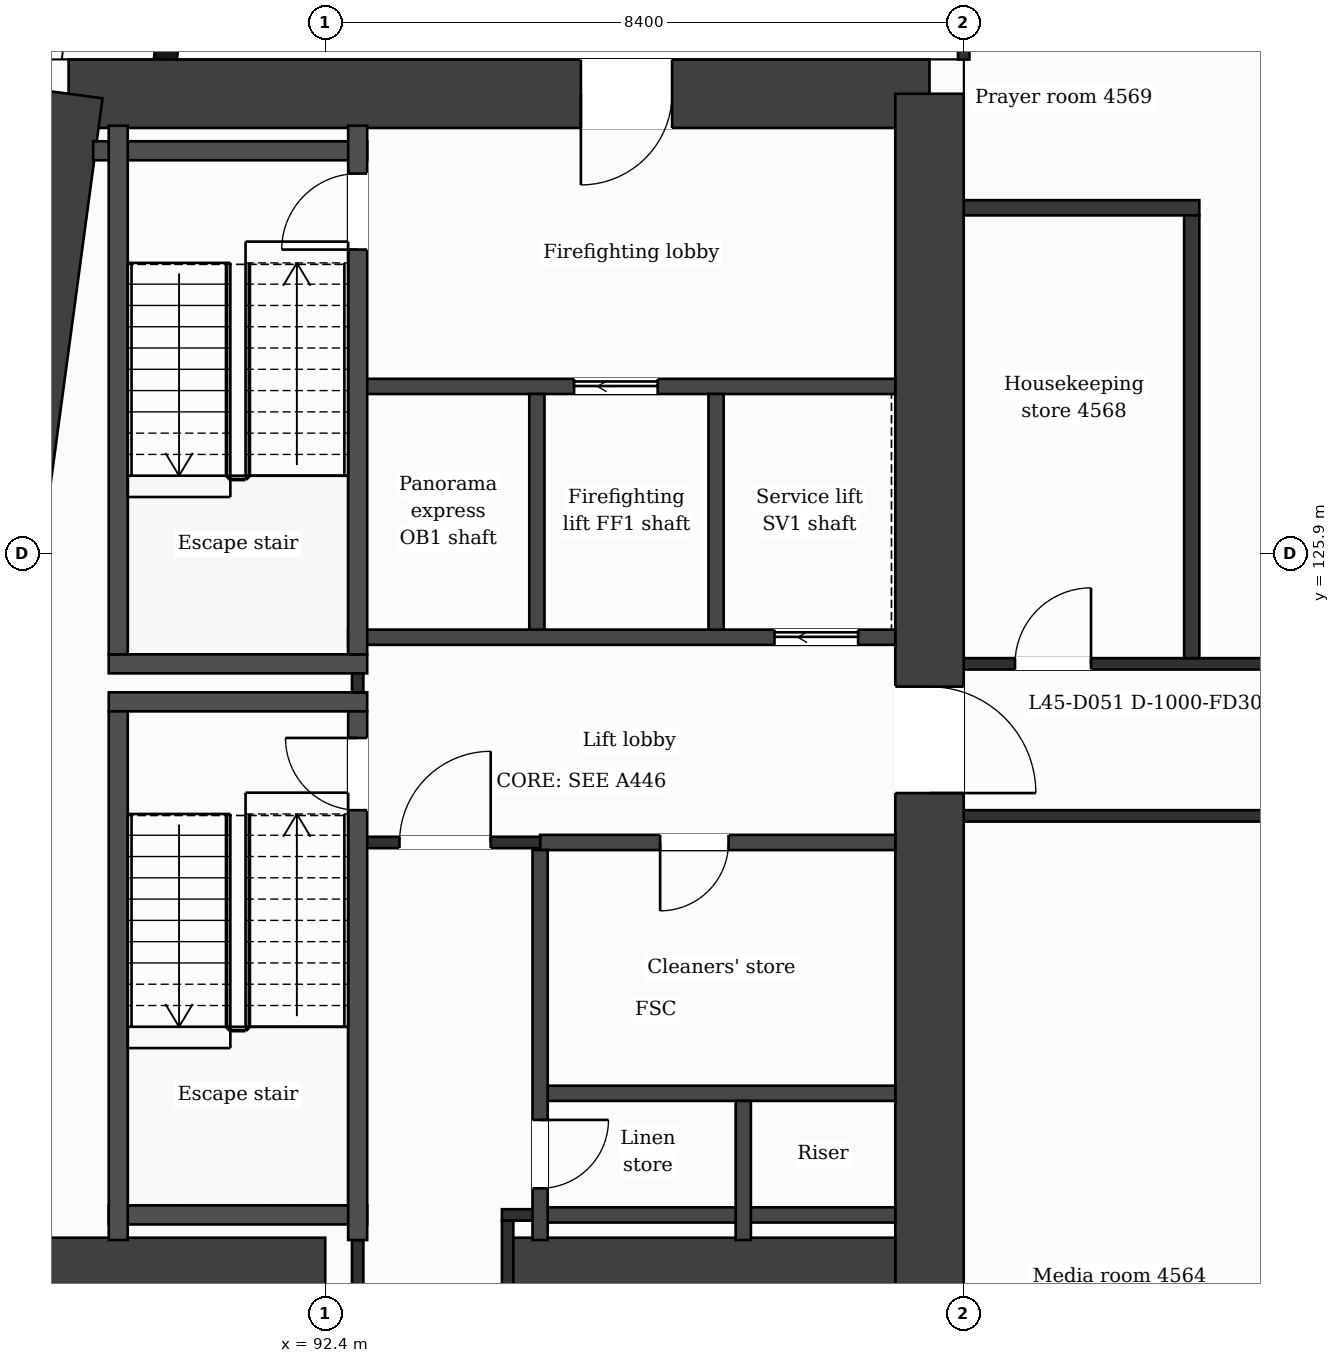
"""IFC4 building model, lengths in metres.
Left out: names, types, materials, properties, quantities, classifications, styles, units other than length and angle.
Written with IfcOpenShell. Run it as: python <this file> out.ifc"""

import sys

from ifc_helpers import new_model, si_unit, direction, frame, frame_2d, origin, place, context, subcontext, project, spatial, rectangle, extrude, element, fill, save


model = new_model("IFC4")
c1 = context("Model", 3, precision=1e-05, world=origin(), true_north=direction((0.0, 1.0)))
c2 = subcontext(c1, "Body", "Model", "MODEL_VIEW")
j1 = project(units=[si_unit("LENGTHUNIT", "METRE"), si_unit("PLANEANGLEUNIT", "RADIAN")], contexts=[c1])
p1 = place(None, origin())
s1 = spatial("IfcSite", under=j1, at=p1, CompositionType="ELEMENT")
p2 = place(p1, origin())
s2 = spatial("IfcBuilding", under=s1, at=p2, CompositionType="ELEMENT")
p3 = place(p2, frame((0.0, 0.0, 188.5)))
s3 = spatial("IfcBuildingStorey", under=s2, at=p3, CompositionType="ELEMENT", Elevation=188.5)
p4 = place(p3, frame((89.024, 131.95, 0.0), z_axis=(0.0, 0.0, 1.0), x_axis=(1.0, 0.0, 0.0)))
e1 = element("IfcWall", 1, at=p4, inside=s3, PredefinedType="SHEAR", context=c2, shape_type="SweptSolid", body=[
    extrude(rectangle(XDim=11.326, YDim=0.9, at=frame_2d((5.663, 0.0))), origin(), (0.0, 0.0, 1.0), 3.7),
])
p5 = place(p4, frame((6.739, 0.0, 0.0)))
e2 = element("IfcOpeningElement", 2, at=p5, cuts=e1, PredefinedType="OPENING", context=c2, shape_type="SweptSolid", body=[
    extrude(rectangle(XDim=1.2, YDim=2.1, at=frame_2d((0.6, 1.05))), frame((0.0, 0.46, 0.0), z_axis=(0.0, -1.0, 0.0), x_axis=(1.0, 0.0, 0.0)), (0.0, 0.0, 1.0), 0.92),
])
p6 = place(p3, frame((100.35, 131.95, 0.0), z_axis=(0.0, 0.0, 1.0), x_axis=(0.0, -1.0, 0.0)))
e3 = element("IfcWall", 3, at=p6, inside=s3, PredefinedType="SHEAR", context=c2, shape_type="SweptSolid", body=[
    extrude(rectangle(XDim=21.1, YDim=0.9, at=frame_2d((10.55, 0.0))), origin(), (0.0, 0.0, 1.0), 3.7),
])
p7 = place(p6, frame((7.8, 0.0, 0.0)))
e4 = element("IfcOpeningElement", 4, at=p7, cuts=e3, PredefinedType="OPENING", context=c2, shape_type="SweptSolid", body=[
    extrude(rectangle(XDim=1.4, YDim=2.1, at=frame_2d((0.7, 1.05))), frame((0.0, 0.46, 0.0), z_axis=(0.0, -1.0, 0.0), x_axis=(1.0, 0.0, 0.0)), (0.0, 0.0, 1.0), 0.92),
])
p8 = place(p3, frame((86.184, 110.85, 0.0), z_axis=(0.0, 0.0, 1.0), x_axis=(0.133410495943, 0.991060865725, 0.0)))
e5 = element("IfcWall", 5, at=p8, inside=s3, PredefinedType="SHEAR", context=c2, shape_type="SweptSolid", body=[
    extrude(rectangle(XDim=21.29, YDim=0.9, at=frame_2d((10.645, 0.0))), origin(), (0.0, 0.0, 1.0), 3.7),
])
p9 = place(p3, frame((87.323, 116.45, 0.0), z_axis=(0.0, 0.0, 1.0), x_axis=(1.0, 0.0, 0.0)))
e6 = element("IfcWall", 6, at=p9, inside=s3, PredefinedType="SHEAR", context=c2, shape_type="SweptSolid", body=[
    extrude(rectangle(XDim=5.077, YDim=0.9, at=frame_2d((2.539, 0.0))), origin(), (0.0, 0.0, 1.0), 3.7),
])
p10 = place(p3, frame((94.8, 116.45, 0.0), z_axis=(0.0, 0.0, 1.0), x_axis=(1.0, 0.0, 0.0)))
e7 = element("IfcWall", 7, at=p10, inside=s3, PredefinedType="SHEAR", context=c2, shape_type="SweptSolid", body=[
    extrude(rectangle(XDim=5.1, YDim=0.9, at=frame_2d((2.55, 0.0))), origin(), (0.0, 0.0, 1.0), 3.7),
])
p11 = place(p3, frame((91.177, 138.95, 0.0), z_axis=(0.0, 0.0, 1.0), x_axis=(-0.133426664613, -0.991058689065, 0.0)))
e8 = element("IfcWall", 8, at=p11, inside=s3, PredefinedType="SOLIDWALL", context=c2, shape_type="SweptSolid", body=[
    extrude(rectangle(XDim=6.609, YDim=0.3, at=frame_2d((3.305, 0.0))), origin(), (0.0, 0.0, 1.0), 3.25),
])
p12 = place(p11, frame((1.039, 0.0, 0.9)))
e9 = element("IfcOpeningElement", 9, at=p12, cuts=e8, PredefinedType="OPENING", context=c2, shape_type="SweptSolid", body=[
    extrude(rectangle(XDim=1.2, YDim=2.1, at=frame_2d((0.6, 1.05))), frame((0.0, 0.16, 0.0), z_axis=(0.0, -1.0, 0.0), x_axis=(1.0, 0.0, 0.0)), (0.0, 0.0, 1.0), 0.32),
])
p13 = place(p11, frame((4.294, 0.0, 0.0)))
e10 = element("IfcOpeningElement", 10, at=p13, cuts=e8, PredefinedType="OPENING", context=c2, shape_type="SweptSolid", body=[
    extrude(rectangle(XDim=1.2, YDim=2.4, at=frame_2d((0.6, 1.2))), frame((0.0, 0.16, 0.0), z_axis=(0.0, -1.0, 0.0), x_axis=(1.0, 0.0, 0.0)), (0.0, 0.0, 1.0), 0.32),
])
p14 = place(p3, frame((95.227, 117.2, 0.0), z_axis=(0.0, 0.0, 1.0), x_axis=(1.0, 0.0, 0.0)))
e11 = element("IfcWall", 11, at=p14, inside=s3, PredefinedType="PARTITIONING", context=c2, shape_type="SweptSolid", body=[
    extrude(rectangle(XDim=4.673, YDim=0.2, at=frame_2d((2.336, 0.0))), origin(), (0.0, 0.0, 1.0), 3.25),
])
p15 = place(p3, frame((94.725, 117.2, 0.0), z_axis=(0.0, 0.0, 1.0), x_axis=(1.0, 0.0, 0.0)))
e12 = element("IfcWall", 12, at=p15, inside=s3, PredefinedType="PARTITIONING", context=c2, shape_type="SweptSolid", body=[
    extrude(rectangle(XDim=0.502, YDim=0.15, at=frame_2d((0.251, 0.0))), origin(), (0.0, 0.0, 1.0), 3.25),
])
p16 = place(p3, frame((89.552, 117.2, 0.0), z_axis=(0.0, 0.0, 1.0), x_axis=(1.0, 0.0, 0.0)))
e13 = element("IfcWall", 13, at=p16, inside=s3, PredefinedType="PARTITIONING", context=c2, shape_type="SweptSolid", body=[
    extrude(rectangle(XDim=3.4, YDim=0.25, at=frame_2d((1.7, 0.0))), origin(), (0.0, 0.0, 1.0), 3.25),
])
p17 = place(p3, frame((95.227, 118.8, 0.0), z_axis=(0.0, 0.0, 1.0), x_axis=(1.0, 0.0, 0.0)))
e14 = element("IfcWall", 14, at=p17, inside=s3, PredefinedType="PARTITIONING", context=c2, shape_type="SweptSolid", body=[
    extrude(rectangle(XDim=4.673, YDim=0.2, at=frame_2d((2.336, 0.0))), origin(), (0.0, 0.0, 1.0), 3.25),
])
p18 = place(p3, frame((95.227, 122.1, 0.0), z_axis=(0.0, 0.0, 1.0), x_axis=(1.0, 0.0, 0.0)))
e15 = element("IfcWall", 15, at=p18, inside=s3, PredefinedType="PARTITIONING", context=c2, shape_type="SweptSolid", body=[
    extrude(rectangle(XDim=4.673, YDim=0.2, at=frame_2d((2.336, 0.0))), origin(), (0.0, 0.0, 1.0), 3.25),
])
p19 = place(p18, frame((1.579, 0.0, 0.0)))
e16 = element("IfcOpeningElement", 16, at=p19, cuts=e15, PredefinedType="OPENING", context=c2, shape_type="SweptSolid", body=[
    extrude(rectangle(XDim=0.9, YDim=2.1, at=frame_2d((0.45, 1.05))), frame((0.0, 0.11, 0.0), z_axis=(0.0, -1.0, 0.0), x_axis=(1.0, 0.0, 0.0)), (0.0, 0.0, 1.0), 0.22),
])
p20 = place(p3, frame((92.827, 122.1, 0.0), z_axis=(0.0, 0.0, 1.0), x_axis=(1.0, 0.0, 0.0)))
e17 = element("IfcWall", 17, at=p20, inside=s3, PredefinedType="PARTITIONING", context=c2, shape_type="SweptSolid", body=[
    extrude(rectangle(XDim=2.4, YDim=0.15, at=frame_2d((1.2, 0.0))), origin(), (0.0, 0.0, 1.0), 3.25),
])
p21 = place(p20, frame((0.55, 0.0, 0.0)))
e18 = element("IfcOpeningElement", 18, at=p21, cuts=e17, PredefinedType="OPENING", context=c2, shape_type="SweptSolid", body=[
    extrude(rectangle(XDim=1.2, YDim=2.1, at=frame_2d((0.6, 1.05))), frame((0.0, 0.085, 0.0), z_axis=(0.0, -1.0, 0.0), x_axis=(1.0, 0.0, 0.0)), (0.0, 0.0, 1.0), 0.17),
])
p22 = place(p3, frame((100.8, 122.45, 0.0), z_axis=(0.0, 0.0, 1.0), x_axis=(1.0, 0.0, 0.0)))
e19 = element("IfcWall", 19, at=p22, inside=s3, PredefinedType="PARTITIONING", context=c2, shape_type="SweptSolid", body=[
    extrude(rectangle(XDim=25.2, YDim=0.15, at=frame_2d((12.6, 0.0))), origin(), (0.0, 0.0, 1.0), 3.25),
])
for number, where, z_axis, x_axis in (
    (20, (89.552, 123.95, 0.0), (0.0, 0.0, 1.0), (1.0, 0.0, 0.0)),
    (21, (89.552, 124.45, 0.0), (0.0, 0.0, 1.0), (1.0, 0.0, 0.0)),
):
    element("IfcWall", number, at=place(p3, frame(where, z_axis=z_axis, x_axis=x_axis)), inside=s3, PredefinedType="PARTITIONING", context=c2, shape_type="SweptSolid", body=[
        extrude(rectangle(XDim=3.4, YDim=0.25, at=frame_2d((1.7, 0.0))), origin(), (0.0, 0.0, 1.0), 3.25),
    ])
p23 = place(p3, frame((100.8, 124.45, 0.0), z_axis=(0.0, 0.0, 1.0), x_axis=(1.0, 0.0, 0.0)))
e22 = element("IfcWall", 22, at=p23, inside=s3, PredefinedType="PARTITIONING", context=c2, shape_type="SweptSolid", body=[
    extrude(rectangle(XDim=25.2, YDim=0.15, at=frame_2d((12.6, 0.0))), origin(), (0.0, 0.0, 1.0), 3.25),
])
p24 = place(p23, frame((0.675, 0.0, 0.0)))
e23 = element("IfcOpeningElement", 23, at=p24, cuts=e22, PredefinedType="OPENING", context=c2, shape_type="SweptSolid", body=[
    extrude(rectangle(XDim=1.0, YDim=2.1, at=frame_2d((0.5, 1.05))), frame((0.0, 0.085, 0.0), z_axis=(0.0, -1.0, 0.0), x_axis=(1.0, 0.0, 0.0)), (0.0, 0.0, 1.0), 0.17),
])
p25 = place(p23, frame((5.175, 0.0, 0.0)))
e24 = element("IfcOpeningElement", 24, at=p25, cuts=e22, PredefinedType="OPENING", context=c2, shape_type="SweptSolid", body=[
    extrude(rectangle(XDim=1.0, YDim=2.1, at=frame_2d((0.5, 1.05))), frame((0.0, 0.085, 0.0), z_axis=(0.0, -1.0, 0.0), x_axis=(1.0, 0.0, 0.0)), (0.0, 0.0, 1.0), 0.17),
])
p26 = place(p23, frame((10.425, 0.0, 0.0)))
e25 = element("IfcOpeningElement", 25, at=p26, cuts=e22, PredefinedType="OPENING", context=c2, shape_type="SweptSolid", body=[
    extrude(rectangle(XDim=1.0, YDim=2.1, at=frame_2d((0.5, 1.05))), frame((0.0, 0.085, 0.0), z_axis=(0.0, -1.0, 0.0), x_axis=(1.0, 0.0, 0.0)), (0.0, 0.0, 1.0), 0.17),
])
p27 = place(p23, frame((22.175, 0.0, 0.0)))
e26 = element("IfcOpeningElement", 26, at=p27, cuts=e22, PredefinedType="OPENING", context=c2, shape_type="SweptSolid", body=[
    extrude(rectangle(XDim=1.0, YDim=2.1, at=frame_2d((0.5, 1.05))), frame((0.0, 0.085, 0.0), z_axis=(0.0, -1.0, 0.0), x_axis=(1.0, 0.0, 0.0)), (0.0, 0.0, 1.0), 0.17),
])
p28 = place(p3, frame((92.702, 124.8, 0.0), z_axis=(0.0, 0.0, 1.0), x_axis=(1.0, 0.0, 0.0)))
e27 = element("IfcWall", 27, at=p28, inside=s3, PredefinedType="PARTITIONING", context=c2, shape_type="SweptSolid", body=[
    extrude(rectangle(XDim=7.198, YDim=0.2, at=frame_2d((3.599, 0.0))), origin(), (0.0, 0.0, 1.0), 3.25),
])
p29 = place(p28, frame((5.609, 0.0, 0.0)))
e28 = element("IfcOpeningElement", 28, at=p29, cuts=e27, PredefinedType="OPENING", context=c2, shape_type="SweptSolid", body=[
    extrude(rectangle(XDim=1.1, YDim=2.1, at=frame_2d((0.55, 1.05))), frame((0.0, 0.11, 0.0), z_axis=(0.0, -1.0, 0.0), x_axis=(1.0, 0.0, 0.0)), (0.0, 0.0, 1.0), 0.22),
])
p30 = place(p3, frame((92.827, 128.1, 0.0), z_axis=(0.0, 0.0, 1.0), x_axis=(1.0, 0.0, 0.0)))
e29 = element("IfcWall", 29, at=p30, inside=s3, PredefinedType="PARTITIONING", context=c2, shape_type="SweptSolid", body=[
    extrude(rectangle(XDim=7.073, YDim=0.2, at=frame_2d((3.537, 0.0))), origin(), (0.0, 0.0, 1.0), 3.25),
])
p31 = place(p30, frame((2.847, 0.0, 0.0)))
e30 = element("IfcOpeningElement", 30, at=p31, cuts=e29, PredefinedType="OPENING", context=c2, shape_type="SweptSolid", body=[
    extrude(rectangle(XDim=1.1, YDim=2.1, at=frame_2d((0.55, 1.05))), frame((0.0, 0.11, 0.0), z_axis=(0.0, -1.0, 0.0), x_axis=(1.0, 0.0, 0.0)), (0.0, 0.0, 1.0), 0.22),
])
p32 = place(p3, frame((100.8, 130.45, 0.0), z_axis=(0.0, 0.0, 1.0), x_axis=(1.0, 0.0, 0.0)))
e31 = element("IfcWall", 31, at=p32, inside=s3, PredefinedType="PARTITIONING", context=c2, shape_type="SweptSolid", body=[
    extrude(rectangle(XDim=3.1, YDim=0.2, at=frame_2d((1.55, 0.0))), origin(), (0.0, 0.0, 1.0), 3.25),
])
p33 = place(p3, frame((89.347, 131.2, 0.0), z_axis=(0.0, 0.0, 1.0), x_axis=(1.0, 0.0, 0.0)))
e32 = element("IfcWall", 32, at=p33, inside=s3, PredefinedType="PARTITIONING", context=c2, shape_type="SweptSolid", body=[
    extrude(rectangle(XDim=3.604, YDim=0.25, at=frame_2d((1.802, 0.0))), origin(), (0.0, 0.0, 1.0), 3.25),
])
p34 = place(p3, frame((89.677, 116.87, 0.0), z_axis=(0.0, 0.0, 1.0), x_axis=(0.0, 1.0, 0.0)))
e33 = element("IfcWall", 33, at=p34, inside=s3, PredefinedType="PARTITIONING", context=c2, shape_type="SweptSolid", body=[
    extrude(rectangle(XDim=6.955, YDim=0.25, at=frame_2d((3.478, 0.0))), origin(), (0.0, 0.0, 1.0), 3.25),
])
p35 = place(p3, frame((89.677, 124.575, 0.0), z_axis=(0.0, 0.0, 1.0), x_axis=(0.0, 1.0, 0.0)))
e34 = element("IfcWall", 34, at=p35, inside=s3, PredefinedType="PARTITIONING", context=c2, shape_type="SweptSolid", body=[
    extrude(rectangle(XDim=6.955, YDim=0.25, at=frame_2d((3.478, 0.0))), origin(), (0.0, 0.0, 1.0), 3.25),
])
p36 = place(p3, frame((92.827, 116.0, 0.0), z_axis=(0.0, 0.0, 1.0), x_axis=(0.0, 1.0, 0.0)))
e35 = element("IfcWall", 35, at=p36, inside=s3, PredefinedType="PARTITIONING", context=c2, shape_type="SweptSolid", body=[
    extrude(rectangle(XDim=0.87, YDim=0.15, at=frame_2d((0.435, 0.0))), origin(), (0.0, 0.0, 1.0), 3.25),
])
p37 = place(p3, frame((92.827, 124.075, 0.0), z_axis=(0.0, 0.0, 1.0), x_axis=(0.0, 1.0, 0.0)))
e36 = element("IfcWall", 36, at=p37, inside=s3, PredefinedType="PARTITIONING", context=c2, shape_type="SweptSolid", body=[
    extrude(rectangle(XDim=0.25, YDim=0.15, at=frame_2d((0.125, 0.0))), origin(), (0.0, 0.0, 1.0), 3.25),
])
p38 = place(p3, frame((92.827, 116.87, 0.0), z_axis=(0.0, 0.0, 1.0), x_axis=(0.0, 1.0, 0.0)))
e37 = element("IfcWall", 37, at=p38, inside=s3, PredefinedType="PARTITIONING", context=c2, shape_type="SweptSolid", body=[
    extrude(rectangle(XDim=6.955, YDim=0.25, at=frame_2d((3.478, 0.0))), origin(), (0.0, 0.0, 1.0), 3.25),
])
p39 = place(p38, frame((5.655, 0.0, 0.0)))
e38 = element("IfcOpeningElement", 38, at=p39, cuts=e37, PredefinedType="OPENING", context=c2, shape_type="SweptSolid", body=[
    extrude(rectangle(XDim=0.95, YDim=2.1, at=frame_2d((0.475, 1.05))), frame((0.0, 0.135, 0.0), z_axis=(0.0, -1.0, 0.0), x_axis=(1.0, 0.0, 0.0)), (0.0, 0.0, 1.0), 0.27),
])
p40 = place(p3, frame((92.827, 124.575, 0.0), z_axis=(0.0, 0.0, 1.0), x_axis=(0.0, 1.0, 0.0)))
e39 = element("IfcWall", 39, at=p40, inside=s3, PredefinedType="PARTITIONING", context=c2, shape_type="SweptSolid", body=[
    extrude(rectangle(XDim=6.955, YDim=0.25, at=frame_2d((3.478, 0.0))), origin(), (0.0, 0.0, 1.0), 3.25),
])
p41 = place(p40, frame((5.325, 0.0, 0.0)))
e40 = element("IfcOpeningElement", 40, at=p41, cuts=e39, PredefinedType="OPENING", context=c2, shape_type="SweptSolid", body=[
    extrude(rectangle(XDim=1.0, YDim=2.1, at=frame_2d((0.5, 1.05))), frame((0.0, 0.135, 0.0), z_axis=(0.0, -1.0, 0.0), x_axis=(1.0, 0.0, 0.0)), (0.0, 0.0, 1.0), 0.27),
])
p42 = place(p3, frame((94.8, 116.0, 0.0), z_axis=(0.0, 0.0, 1.0), x_axis=(0.0, 1.0, 0.0)))
e41 = element("IfcWall", 41, at=p42, inside=s3, PredefinedType="PARTITIONING", context=c2, shape_type="SweptSolid", body=[
    extrude(rectangle(XDim=1.125, YDim=0.15, at=frame_2d((0.562, 0.0))), origin(), (0.0, 0.0, 1.0), 3.25),
])
p43 = place(p3, frame((95.185, 124.9, 0.0), z_axis=(0.0, 0.0, 1.0), x_axis=(0.0, 1.0, 0.0)))
e42 = element("IfcWall", 42, at=p43, inside=s3, PredefinedType="PARTITIONING", context=c2, shape_type="SweptSolid", body=[
    extrude(rectangle(XDim=3.1, YDim=0.2, at=frame_2d((1.55, 0.0))), origin(), (0.0, 0.0, 1.0), 3.25),
])
p44 = place(p3, frame((95.227, 116.87, 0.0), z_axis=(0.0, 0.0, 1.0), x_axis=(0.0, 1.0, 0.0)))
e43 = element("IfcWall", 43, at=p44, inside=s3, PredefinedType="PARTITIONING", context=c2, shape_type="SweptSolid", body=[
    extrude(rectangle(XDim=5.13, YDim=0.2, at=frame_2d((2.565, 0.0))), origin(), (0.0, 0.0, 1.0), 3.25),
])
p45 = place(p44, frame((0.68, 0.0, 0.0)))
e44 = element("IfcOpeningElement", 44, at=p45, cuts=e43, PredefinedType="OPENING", context=c2, shape_type="SweptSolid", body=[
    extrude(rectangle(XDim=0.9, YDim=2.1, at=frame_2d((0.45, 1.05))), frame((0.0, 0.11, 0.0), z_axis=(0.0, -1.0, 0.0), x_axis=(1.0, 0.0, 0.0)), (0.0, 0.0, 1.0), 0.22),
])
p46 = place(p3, frame((97.542, 124.9, 0.0), z_axis=(0.0, 0.0, 1.0), x_axis=(0.0, 1.0, 0.0)))
e45 = element("IfcWall", 45, at=p46, inside=s3, PredefinedType="PARTITIONING", context=c2, shape_type="SweptSolid", body=[
    extrude(rectangle(XDim=3.1, YDim=0.2, at=frame_2d((1.55, 0.0))), origin(), (0.0, 0.0, 1.0), 3.25),
])
p47 = place(p3, frame((97.9, 116.87, 0.0), z_axis=(0.0, 0.0, 1.0), x_axis=(0.0, 1.0, 0.0)))
e46 = element("IfcWall", 46, at=p47, inside=s3, PredefinedType="PARTITIONING", context=c2, shape_type="SweptSolid", body=[
    extrude(rectangle(XDim=1.83, YDim=0.2, at=frame_2d((0.915, 0.0))), origin(), (0.0, 0.0, 1.0), 3.25),
])
p48 = place(p3, frame((100.8, 132.4, 0.0), z_axis=(0.0, 0.0, 1.0), x_axis=(0.0, 1.0, 0.0)))
e47 = element("IfcWall", 47, at=p48, inside=s3, PredefinedType="PARTITIONING", context=c2, shape_type="SweptSolid", body=[
    extrude(rectangle(XDim=1.325, YDim=0.15, at=frame_2d((0.663, 0.0))), origin(), (0.0, 0.0, 1.0), 3.25),
])
p49 = place(p3, frame((103.8, 124.525, 0.0), z_axis=(0.0, 0.0, 1.0), x_axis=(0.0, 1.0, 0.0)))
e48 = element("IfcWall", 48, at=p49, inside=s3, PredefinedType="PARTITIONING", context=c2, shape_type="SweptSolid", body=[
    extrude(rectangle(XDim=5.825, YDim=0.2, at=frame_2d((2.913, 0.0))), origin(), (0.0, 0.0, 1.0), 3.25),
])
p50 = place(p21, origin())
e49 = element("IfcDoor", 49, at=p50, inside=s3, OperationType="SINGLE_SWING_RIGHT", PredefinedType="DOOR", context=c2, shape_type="SweptSolid", body=[
    extrude(rectangle(XDim=1.2, YDim=2.1, at=frame_2d((0.6, 1.05))), frame((0.0, 0.025, 0.0), z_axis=(0.0, -1.0, 0.0), x_axis=(1.0, 0.0, 0.0)), (0.0, 0.0, 1.0), 0.05),
])
fill(e18, e49)
p51 = place(p31, origin())
e50 = element("IfcDoor", 50, at=p51, inside=s3, OperationType="SLIDING_TO_LEFT", PredefinedType="DOOR", context=c2, shape_type="SweptSolid", body=[
    extrude(rectangle(XDim=1.1, YDim=2.1, at=frame_2d((0.55, 1.05))), frame((0.0, 0.025, 0.0), z_axis=(0.0, -1.0, 0.0), x_axis=(1.0, 0.0, 0.0)), (0.0, 0.0, 1.0), 0.05),
])
fill(e30, e50)
p52 = place(p29, origin())
e51 = element("IfcDoor", 51, at=p52, inside=s3, OperationType="SLIDING_TO_LEFT", PredefinedType="DOOR", context=c2, shape_type="SweptSolid", body=[
    extrude(rectangle(XDim=1.1, YDim=2.1, at=frame_2d((0.55, 1.05))), frame((0.0, 0.025, 0.0), z_axis=(0.0, -1.0, 0.0), x_axis=(1.0, 0.0, 0.0)), (0.0, 0.0, 1.0), 0.05),
])
fill(e28, e51)
p53 = place(p19, origin())
e52 = element("IfcDoor", 52, at=p53, inside=s3, OperationType="SINGLE_SWING_LEFT", PredefinedType="DOOR", context=c2, shape_type="SweptSolid", body=[
    extrude(rectangle(XDim=0.9, YDim=2.1, at=frame_2d((0.45, 1.05))), frame((0.0, 0.025, 0.0), z_axis=(0.0, -1.0, 0.0), x_axis=(1.0, 0.0, 0.0)), (0.0, 0.0, 1.0), 0.05),
])
fill(e16, e52)
p54 = place(p39, origin())
e53 = element("IfcDoor", 53, at=p54, inside=s3, OperationType="SINGLE_SWING_RIGHT", PredefinedType="DOOR", context=c2, shape_type="SweptSolid", body=[
    extrude(rectangle(XDim=0.95, YDim=2.1, at=frame_2d((0.475, 1.05))), frame((0.0, 0.025, 0.0), z_axis=(0.0, -1.0, 0.0), x_axis=(1.0, 0.0, 0.0)), (0.0, 0.0, 1.0), 0.05),
])
fill(e38, e53)
p55 = place(p41, origin())
e54 = element("IfcDoor", 54, at=p55, inside=s3, OperationType="SINGLE_SWING_LEFT", PredefinedType="DOOR", context=c2, shape_type="SweptSolid", body=[
    extrude(rectangle(XDim=1.0, YDim=2.1, at=frame_2d((0.5, 1.05))), frame((0.0, 0.025, 0.0), z_axis=(0.0, -1.0, 0.0), x_axis=(1.0, 0.0, 0.0)), (0.0, 0.0, 1.0), 0.05),
])
fill(e40, e54)
p56 = place(p45, origin())
e55 = element("IfcDoor", 55, at=p56, inside=s3, OperationType="SINGLE_SWING_RIGHT", PredefinedType="DOOR", context=c2, shape_type="SweptSolid", body=[
    extrude(rectangle(XDim=0.9, YDim=2.1, at=frame_2d((0.45, 1.05))), frame((0.0, 0.025, 0.0), z_axis=(0.0, -1.0, 0.0), x_axis=(1.0, 0.0, 0.0)), (0.0, 0.0, 1.0), 0.05),
])
fill(e44, e55)
p57 = place(p24, origin())
e56 = element("IfcDoor", 56, at=p57, inside=s3, OperationType="SINGLE_SWING_RIGHT", PredefinedType="DOOR", context=c2, shape_type="SweptSolid", body=[
    extrude(rectangle(XDim=1.0, YDim=2.1, at=frame_2d((0.5, 1.05))), frame((0.0, 0.025, 0.0), z_axis=(0.0, -1.0, 0.0), x_axis=(1.0, 0.0, 0.0)), (0.0, 0.0, 1.0), 0.05),
])
fill(e23, e56)
p58 = place(p5, origin())
e57 = element("IfcDoor", 57, at=p58, inside=s3, OperationType="SINGLE_SWING_LEFT", PredefinedType="DOOR", context=c2, shape_type="SweptSolid", body=[
    extrude(rectangle(XDim=1.2, YDim=2.1, at=frame_2d((0.6, 1.05))), frame((0.0, 0.025, 0.0), z_axis=(0.0, -1.0, 0.0), x_axis=(1.0, 0.0, 0.0)), (0.0, 0.0, 1.0), 0.05),
])
fill(e2, e57)
p59 = place(p7, origin())
e58 = element("IfcDoor", 58, at=p59, inside=s3, OperationType="SINGLE_SWING_RIGHT", PredefinedType="DOOR", context=c2, shape_type="SweptSolid", body=[
    extrude(rectangle(XDim=1.4, YDim=2.1, at=frame_2d((0.7, 1.05))), frame((0.0, 0.025, 0.0), z_axis=(0.0, -1.0, 0.0), x_axis=(1.0, 0.0, 0.0)), (0.0, 0.0, 1.0), 0.05),
])
fill(e4, e58)
save(model, sys.argv[1])
